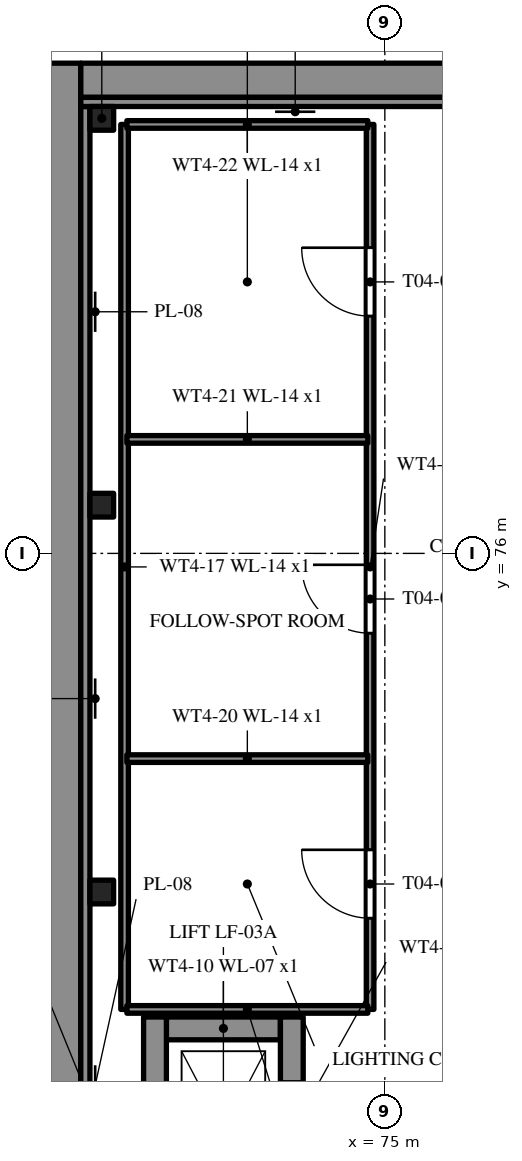
"""IFC4 building model, lengths in metres.
Left out: names, types, materials, properties, quantities, classifications, styles, units other than length and angle.
Written with IfcOpenShell. Run it as: python <this file> out.ifc"""

import sys

from ifc_helpers import new_model, si_unit, direction, frame, frame_2d, origin, origin_2d, place, context, subcontext, project, spatial, rectangle, i_section, extrude, element, fill, save


model = new_model("IFC4")
c1 = context("Model", 3, precision=1e-05, world=origin(), true_north=direction((0.0, 1.0)))
c2 = subcontext(c1, "Body", "Model", "MODEL_VIEW")
j1 = project(units=[si_unit("LENGTHUNIT", "METRE"), si_unit("PLANEANGLEUNIT", "RADIAN")], contexts=[c1])
p1 = place(None, origin())
s1 = spatial("IfcSite", under=j1, at=p1, CompositionType="ELEMENT")
p2 = place(p1, origin())
s2 = spatial("IfcBuilding", under=s1, at=p2, CompositionType="ELEMENT")
p3 = place(p2, frame((0.0, 0.0, 19.4)))
s3 = spatial("IfcBuildingStorey", under=s2, at=p3, CompositionType="ELEMENT", Elevation=19.4)
p4 = place(p3, frame((70.775, 55.4, 0.0), z_axis=(0.0, 0.0, 1.0), x_axis=(0.0, 1.0, 0.0)))
e1 = element("IfcWall", 1, at=p4, inside=s3, PredefinedType="SOLIDWALL", context=c2, shape_type="SweptSolid", body=[
    extrude(rectangle(XDim=27.05, YDim=0.45, at=frame_2d((13.525, 0.0))), origin(), (0.0, 0.0, 1.0), 4.6),
])
p5 = place(p3, frame((71.0, 82.225, 0.0), z_axis=(0.0, 0.0, 1.0), x_axis=(1.0, 0.0, 0.0)))
e2 = element("IfcWall", 2, at=p5, inside=s3, PredefinedType="SOLIDWALL", context=c2, shape_type="SweptSolid", body=[
    extrude(rectangle(XDim=26.0, YDim=0.45, at=frame_2d((13.0, 0.0))), origin(), (0.0, 0.0, 1.0), 4.6),
])
for number, where, z_axis, x_axis in (
    (3, (71.276, 71.545, 0.0), (0.0, 0.0, 1.0), (1.0, 0.0, 0.0)),
    (4, (71.276, 76.635, 0.0), (0.0, 0.0, 1.0), (1.0, 0.0, 0.0)),
    (5, (71.276, 81.724, 0.0), (0.0, 0.0, 1.0), (1.0, 0.0, 0.0)),
):
    element("IfcColumn", number, at=place(p3, frame(where, z_axis=z_axis, x_axis=x_axis)), inside=s3, PredefinedType="COLUMN", context=c2, shape_type="SweptSolid", body=[
        extrude(i_section(OverallWidth=0.312, OverallDepth=0.312, WebThickness=0.017, FlangeThickness=0.017, FilletRadius=0.016, at=origin_2d()), origin(), (0.0, 0.0, 1.0), 4.6),
    ])
p6 = place(p3, frame((73.626, 69.75, 0.0), z_axis=(0.0, 0.0, 1.0), x_axis=(-1.0, 0.0, 0.0)))
e6 = element("IfcWall", 6, at=p6, inside=s3, PredefinedType="SHEAR", context=c2, shape_type="SweptSolid", body=[
    extrude(rectangle(XDim=1.5, YDim=0.3, at=frame_2d((0.75, 0.0))), origin(), (0.0, 0.0, 1.0), 4.6),
])
p7 = place(p3, frame((71.976, 66.9, 0.0), z_axis=(0.0, 0.0, 1.0), x_axis=(0.0, 1.0, 0.0)))
e7 = element("IfcWall", 7, at=p7, inside=s3, PredefinedType="SHEAR", context=c2, shape_type="SweptSolid", body=[
    extrude(rectangle(XDim=3.0, YDim=0.3, at=frame_2d((1.5, 0.0))), origin(), (0.0, 0.0, 1.0), 4.6),
])
p8 = place(p3, frame((73.776, 66.9, 0.0), z_axis=(0.0, 0.0, 1.0), x_axis=(0.0, 1.0, 0.0)))
e8 = element("IfcWall", 8, at=p8, inside=s3, PredefinedType="SHEAR", context=c2, shape_type="SweptSolid", body=[
    extrude(rectangle(XDim=3.0, YDim=0.3, at=frame_2d((1.5, 0.0))), origin(), (0.0, 0.0, 1.0), 4.6),
])
p9 = place(p8, frame((0.85, 0.0, 0.0)))
e9 = element("IfcOpeningElement", 9, at=p9, cuts=e8, PredefinedType="OPENING", context=c2, shape_type="SweptSolid", body=[
    extrude(rectangle(XDim=1.3, YDim=2.3, at=frame_2d((0.65, 1.15))), frame((0.0, 0.16, 0.0), z_axis=(0.0, -1.0, 0.0), x_axis=(1.0, 0.0, 0.0)), (0.0, 0.0, 1.0), 0.32),
])
p10 = place(p3, frame((71.576, 70.0, 0.0), z_axis=(0.0, 0.0, 1.0), x_axis=(0.0, 1.0, 0.0)))
e10 = element("IfcWall", 10, at=p10, inside=s3, PredefinedType="PARTITIONING", context=c2, shape_type="SweptSolid", body=[
    extrude(rectangle(XDim=11.644, YDim=0.1, at=frame_2d((5.822, 0.0))), origin(), (0.0, 0.0, 1.0), 4.04),
])
p11 = place(p3, frame((74.806, 70.0, 0.0), z_axis=(0.0, 0.0, 1.0), x_axis=(0.0, 1.0, 0.0)))
e11 = element("IfcWall", 11, at=p11, inside=s3, PredefinedType="PARTITIONING", context=c2, shape_type="SweptSolid", body=[
    extrude(rectangle(XDim=11.644, YDim=0.1, at=frame_2d((5.822, 0.0))), origin(), (0.0, 0.0, 1.0), 4.04),
])
p12 = place(p11, frame((1.2, 0.0, 0.0)))
e12 = element("IfcOpeningElement", 12, at=p12, cuts=e11, PredefinedType="OPENING", context=c2, shape_type="SweptSolid", body=[
    extrude(rectangle(XDim=0.9, YDim=2.1, at=frame_2d((0.45, 1.05))), frame((0.0, 0.06, 0.0), z_axis=(0.0, -1.0, 0.0), x_axis=(1.0, 0.0, 0.0)), (0.0, 0.0, 1.0), 0.12),
])
p13 = place(p11, frame((4.95, 0.0, 0.0)))
e13 = element("IfcOpeningElement", 13, at=p13, cuts=e11, PredefinedType="OPENING", context=c2, shape_type="SweptSolid", body=[
    extrude(rectangle(XDim=0.9, YDim=2.1, at=frame_2d((0.45, 1.05))), frame((0.0, 0.06, 0.0), z_axis=(0.0, -1.0, 0.0), x_axis=(1.0, 0.0, 0.0)), (0.0, 0.0, 1.0), 0.12),
])
p14 = place(p11, frame((9.122, 0.0, 0.0)))
e14 = element("IfcOpeningElement", 14, at=p14, cuts=e11, PredefinedType="OPENING", context=c2, shape_type="SweptSolid", body=[
    extrude(rectangle(XDim=0.9, YDim=2.1, at=frame_2d((0.45, 1.05))), frame((0.0, 0.06, 0.0), z_axis=(0.0, -1.0, 0.0), x_axis=(1.0, 0.0, 0.0)), (0.0, 0.0, 1.0), 0.12),
])
for number, where, z_axis, x_axis in (
    (15, (71.606, 70.0, 0.0), (0.0, 0.0, 1.0), (1.0, 0.0, 0.0)),
    (16, (71.606, 73.3, 0.0), (0.0, 0.0, 1.0), (1.0, 0.0, 0.0)),
    (17, (71.606, 77.5, 0.0), (0.0, 0.0, 1.0), (1.0, 0.0, 0.0)),
    (18, (71.606, 81.644, 0.0), (0.0, 0.0, 1.0), (1.0, 0.0, 0.0)),
):
    element("IfcWall", number, at=place(p3, frame(where, z_axis=z_axis, x_axis=x_axis)), inside=s3, PredefinedType="PARTITIONING", context=c2, shape_type="SweptSolid", body=[
        extrude(rectangle(XDim=3.17, YDim=0.1, at=frame_2d((1.585, 0.0))), origin(), (0.0, 0.0, 1.0), 4.04),
    ])
p15 = place(p3, frame((71.06, 56.0, -1.54), z_axis=(0.0, 0.0, 1.0), x_axis=(0.0, 1.0, 0.0)))
e19 = element("IfcWall", 19, at=p15, inside=s3, PredefinedType="STANDARD", context=c2, shape_type="SweptSolid", body=[
    extrude(rectangle(XDim=25.88, YDim=0.12, at=frame_2d((12.94, 0.0))), origin(), (0.0, 0.0, 1.0), 6.14),
])
p16 = place(p3, frame((71.0, 81.94, -1.395), z_axis=(0.0, 0.0, 1.0), x_axis=(1.0, 0.0, 0.0)))
e20 = element("IfcWall", 20, at=p16, inside=s3, PredefinedType="STANDARD", context=c2, shape_type="SweptSolid", body=[
    extrude(rectangle(XDim=26.0, YDim=0.12, at=frame_2d((13.0, 0.0))), origin(), (0.0, 0.0, 1.0), 5.995),
])
p17 = place(p12, origin())
e21 = element("IfcDoor", 21, at=p17, inside=s3, OperationType="SINGLE_SWING_RIGHT", PredefinedType="DOOR", context=c2, shape_type="SweptSolid", body=[
    extrude(rectangle(XDim=0.9, YDim=2.1, at=frame_2d((0.45, 1.05))), frame((0.0, 0.025, 0.0), z_axis=(0.0, -1.0, 0.0), x_axis=(1.0, 0.0, 0.0)), (0.0, 0.0, 1.0), 0.05),
])
fill(e12, e21)
p18 = place(p13, origin())
e22 = element("IfcDoor", 22, at=p18, inside=s3, OperationType="SINGLE_SWING_RIGHT", PredefinedType="DOOR", context=c2, shape_type="SweptSolid", body=[
    extrude(rectangle(XDim=0.9, YDim=2.1, at=frame_2d((0.45, 1.05))), frame((0.0, 0.025, 0.0), z_axis=(0.0, -1.0, 0.0), x_axis=(1.0, 0.0, 0.0)), (0.0, 0.0, 1.0), 0.05),
])
fill(e13, e22)
p19 = place(p14, origin())
e23 = element("IfcDoor", 23, at=p19, inside=s3, OperationType="SINGLE_SWING_RIGHT", PredefinedType="DOOR", context=c2, shape_type="SweptSolid", body=[
    extrude(rectangle(XDim=0.9, YDim=2.1, at=frame_2d((0.45, 1.05))), frame((0.0, 0.025, 0.0), z_axis=(0.0, -1.0, 0.0), x_axis=(1.0, 0.0, 0.0)), (0.0, 0.0, 1.0), 0.05),
])
fill(e14, e23)
save(model, sys.argv[1])
